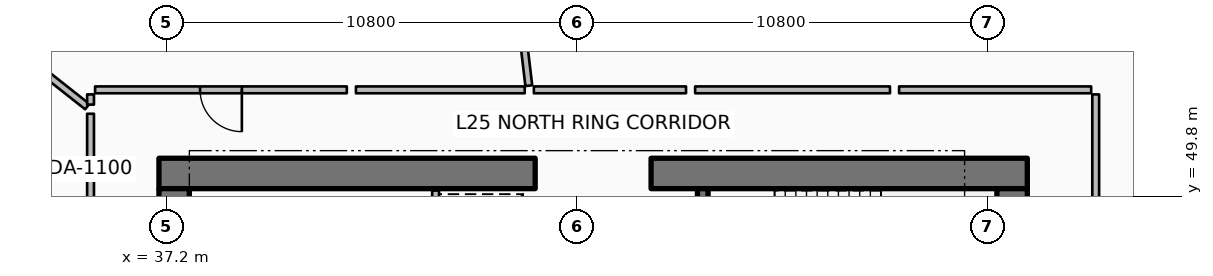
"""IFC4 building model, lengths in metres.
Left out: names, types, materials, properties, quantities, classifications, styles, units other than length and angle.
Written with IfcOpenShell. Run it as: python <this file> out.ifc"""

import sys

from ifc_helpers import new_model, si_unit, direction, frame, frame_2d, origin, place, context, subcontext, project, spatial, rectangle, extrude, element, fill, save


model = new_model("IFC4")
c1 = context("Model", 3, precision=1e-05, world=origin(), true_north=direction((0.0, 1.0)))
c2 = subcontext(c1, "Body", "Model", "MODEL_VIEW")
j1 = project(units=[si_unit("LENGTHUNIT", "METRE"), si_unit("PLANEANGLEUNIT", "RADIAN")], contexts=[c1])
p1 = place(None, origin())
s1 = spatial("IfcSite", under=j1, at=p1, CompositionType="ELEMENT")
p2 = place(p1, origin())
s2 = spatial("IfcBuilding", under=s1, at=p2, CompositionType="ELEMENT")
p3 = place(p2, frame((0.0, 0.0, 101.4)))
s3 = spatial("IfcBuildingStorey", under=s2, at=p3, CompositionType="ELEMENT", Elevation=101.4)
p4 = place(p3, frame((37.0, 50.4, 0.0), z_axis=(0.0, 0.0, 1.0), x_axis=(1.0, 0.0, 0.0)))
e1 = element("IfcWall", 1, at=p4, inside=s3, PredefinedType="SHEAR", context=c2, shape_type="SweptSolid", body=[
    extrude(rectangle(XDim=9.9, YDim=0.8, at=frame_2d((4.95, 0.0))), origin(), (0.0, 0.0, 1.0), 3.75),
])
p5 = place(p3, frame((49.95, 50.4, 0.0), z_axis=(0.0, 0.0, 1.0), x_axis=(1.0, 0.0, 0.0)))
e2 = element("IfcWall", 2, at=p5, inside=s3, PredefinedType="SHEAR", context=c2, shape_type="SweptSolid", body=[
    extrude(rectangle(XDim=9.9, YDim=0.8, at=frame_2d((4.95, 0.0))), origin(), (0.0, 0.0, 1.0), 3.75),
])
for number, where, z_axis, x_axis in (
    (3, (37.4, 34.0, 0.0), (0.0, 0.0, 1.0), (0.0, 1.0, 0.0)),
    (4, (59.45, 34.0, 0.0), (0.0, 0.0, 1.0), (0.0, 1.0, 0.0)),
):
    element("IfcWall", number, at=place(p3, frame(where, z_axis=z_axis, x_axis=x_axis)), inside=s3, PredefinedType="SHEAR", context=c2, shape_type="SweptSolid", body=[
        extrude(rectangle(XDim=16.0, YDim=0.8, at=frame_2d((8.0, 0.0))), origin(), (0.0, 0.0, 1.0), 3.75),
    ])
p6 = place(p3, frame((51.31, 46.5, 0.0), z_axis=(0.0, 0.0, 1.0), x_axis=(0.0, 1.0, 0.0)))
e5 = element("IfcWall", 5, at=p6, inside=s3, PredefinedType="SHEAR", context=c2, shape_type="SweptSolid", body=[
    extrude(rectangle(XDim=3.5, YDim=0.28, at=frame_2d((1.75, 0.0))), origin(), (0.0, 0.0, 1.0), 3.75),
])
p7 = place(p3, frame((44.28, 47.82, 0.0), z_axis=(0.0, 0.0, 1.0), x_axis=(0.0, 1.0, 0.0)))
e6 = element("IfcWall", 6, at=p7, inside=s3, PredefinedType="PARTITIONING", context=c2, shape_type="SweptSolid", body=[
    extrude(rectangle(XDim=2.13, YDim=0.18, at=frame_2d((1.065, 0.0))), origin(), (0.0, 0.0, 1.0), 3.5),
])
p8 = place(p3, frame((46.732, 52.709, 0.0), z_axis=(0.0, 0.0, 1.0), x_axis=(-0.117532311618, 0.993069058891, 0.0)))
e7 = element("IfcWall", 7, at=p8, inside=s3, PredefinedType="PARTITIONING", context=c2, shape_type="SweptSolid", body=[
    extrude(rectangle(XDim=13.138, YDim=0.18, at=frame_2d((6.569, 0.0))), origin(), (0.0, 0.0, 1.0), 2.94),
])
p9 = place(p3, frame((35.114, 52.159, 0.0), z_axis=(0.0, 0.0, 1.0), x_axis=(-0.785295873565, 0.619120659453, 0.0)))
e8 = element("IfcWall", 8, at=p9, inside=s3, PredefinedType="PARTITIONING", context=c2, shape_type="SweptSolid", body=[
    extrude(rectangle(XDim=9.829, YDim=0.18, at=frame_2d((4.915, 0.0))), origin(), (0.0, 0.0, 1.0), 2.94),
])
p10 = place(p3, frame((35.2, 51.971, 0.0), z_axis=(0.0, 0.0, 1.0), x_axis=(0.0, -1.0, 0.0)))
e9 = element("IfcWall", 9, at=p10, inside=s3, PredefinedType="PARTITIONING", context=c2, shape_type="SweptSolid", body=[
    extrude(rectangle(XDim=6.241, YDim=0.18, at=frame_2d((3.12, 0.0))), origin(), (0.0, 0.0, 1.0), 2.94),
])
p11 = place(p10, frame((2.57, 0.0, 0.0)))
e10 = element("IfcOpeningElement", 10, at=p11, cuts=e9, PredefinedType="OPENING", context=c2, shape_type="SweptSolid", body=[
    extrude(rectangle(XDim=1.1, YDim=2.1, at=frame_2d((0.55, 1.05))), frame((0.0, 0.1, 0.0), z_axis=(0.0, -1.0, 0.0), x_axis=(1.0, 0.0, 0.0)), (0.0, 0.0, 1.0), 0.2),
])
p12 = place(p3, frame((61.65, 49.764, 0.0), z_axis=(0.0, 0.0, 1.0), x_axis=(0.0, 1.0, 0.0)))
e11 = element("IfcWall", 11, at=p12, inside=s3, PredefinedType="PARTITIONING", context=c2, shape_type="SweptSolid", body=[
    extrude(rectangle(XDim=2.716, YDim=0.18, at=frame_2d((1.358, 0.0))), origin(), (0.0, 0.0, 1.0), 2.94),
])
p13 = place(p3, frame((61.53, 52.6, 0.0), z_axis=(0.0, 0.0, 1.0), x_axis=(-1.0, 0.0, 0.0)))
e12 = element("IfcWall", 12, at=p13, inside=s3, PredefinedType="PARTITIONING", context=c2, shape_type="SweptSolid", body=[
    extrude(rectangle(XDim=5.054, YDim=0.18, at=frame_2d((2.527, 0.0))), origin(), (0.0, 0.0, 1.0), 2.94),
])
p14 = place(p3, frame((56.236, 52.6, 0.0), z_axis=(0.0, 0.0, 1.0), x_axis=(-1.0, 0.0, 0.0)))
e13 = element("IfcWall", 13, at=p14, inside=s3, PredefinedType="PARTITIONING", context=c2, shape_type="SweptSolid", body=[
    extrude(rectangle(XDim=5.127, YDim=0.18, at=frame_2d((2.563, 0.0))), origin(), (0.0, 0.0, 1.0), 2.94),
])
p15 = place(p3, frame((50.869, 52.6, 0.0), z_axis=(0.0, 0.0, 1.0), x_axis=(-1.0, 0.0, 0.0)))
e14 = element("IfcWall", 14, at=p15, inside=s3, PredefinedType="PARTITIONING", context=c2, shape_type="SweptSolid", body=[
    extrude(rectangle(XDim=4.004, YDim=0.18, at=frame_2d((2.002, 0.0))), origin(), (0.0, 0.0, 1.0), 2.94),
])
p16 = place(p3, frame((41.944, 52.6, 0.0), z_axis=(0.0, 0.0, 1.0), x_axis=(-1.0, 0.0, 0.0)))
e15 = element("IfcWall", 15, at=p16, inside=s3, PredefinedType="PARTITIONING", context=c2, shape_type="SweptSolid", body=[
    extrude(rectangle(XDim=6.624, YDim=0.18, at=frame_2d((3.312, 0.0))), origin(), (0.0, 0.0, 1.0), 2.94),
])
p17 = place(p16, frame((2.762, 0.0, 0.0)))
e16 = element("IfcOpeningElement", 16, at=p17, cuts=e15, PredefinedType="OPENING", context=c2, shape_type="SweptSolid", body=[
    extrude(rectangle(XDim=1.1, YDim=2.1, at=frame_2d((0.55, 1.05))), frame((0.0, 0.1, 0.0), z_axis=(0.0, -1.0, 0.0), x_axis=(1.0, 0.0, 0.0)), (0.0, 0.0, 1.0), 0.2),
])
p18 = place(p3, frame((35.2, 52.48, 0.0), z_axis=(0.0, 0.0, 1.0), x_axis=(0.0, -1.0, 0.0)))
e17 = element("IfcWall", 17, at=p18, inside=s3, PredefinedType="PARTITIONING", context=c2, shape_type="SweptSolid", body=[
    extrude(rectangle(XDim=0.269, YDim=0.18, at=frame_2d((0.135, 0.0))), origin(), (0.0, 0.0, 1.0), 2.94),
])
p19 = place(p3, frame((46.625, 52.6, 0.0), z_axis=(0.0, 0.0, 1.0), x_axis=(-1.0, 0.0, 0.0)))
e18 = element("IfcWall", 18, at=p19, inside=s3, PredefinedType="PARTITIONING", context=c2, shape_type="SweptSolid", body=[
    extrude(rectangle(XDim=4.442, YDim=0.18, at=frame_2d((2.221, 0.0))), origin(), (0.0, 0.0, 1.0), 2.94),
])
p20 = place(p17, origin())
e19 = element("IfcDoor", 19, at=p20, inside=s3, OperationType="SINGLE_SWING_LEFT", PredefinedType="DOOR", context=c2, shape_type="SweptSolid", body=[
    extrude(rectangle(XDim=1.1, YDim=2.1, at=frame_2d((0.55, 1.05))), frame((0.0, 0.025, 0.0), z_axis=(0.0, -1.0, 0.0), x_axis=(1.0, 0.0, 0.0)), (0.0, 0.0, 1.0), 0.05),
])
fill(e16, e19)
save(model, sys.argv[1])
